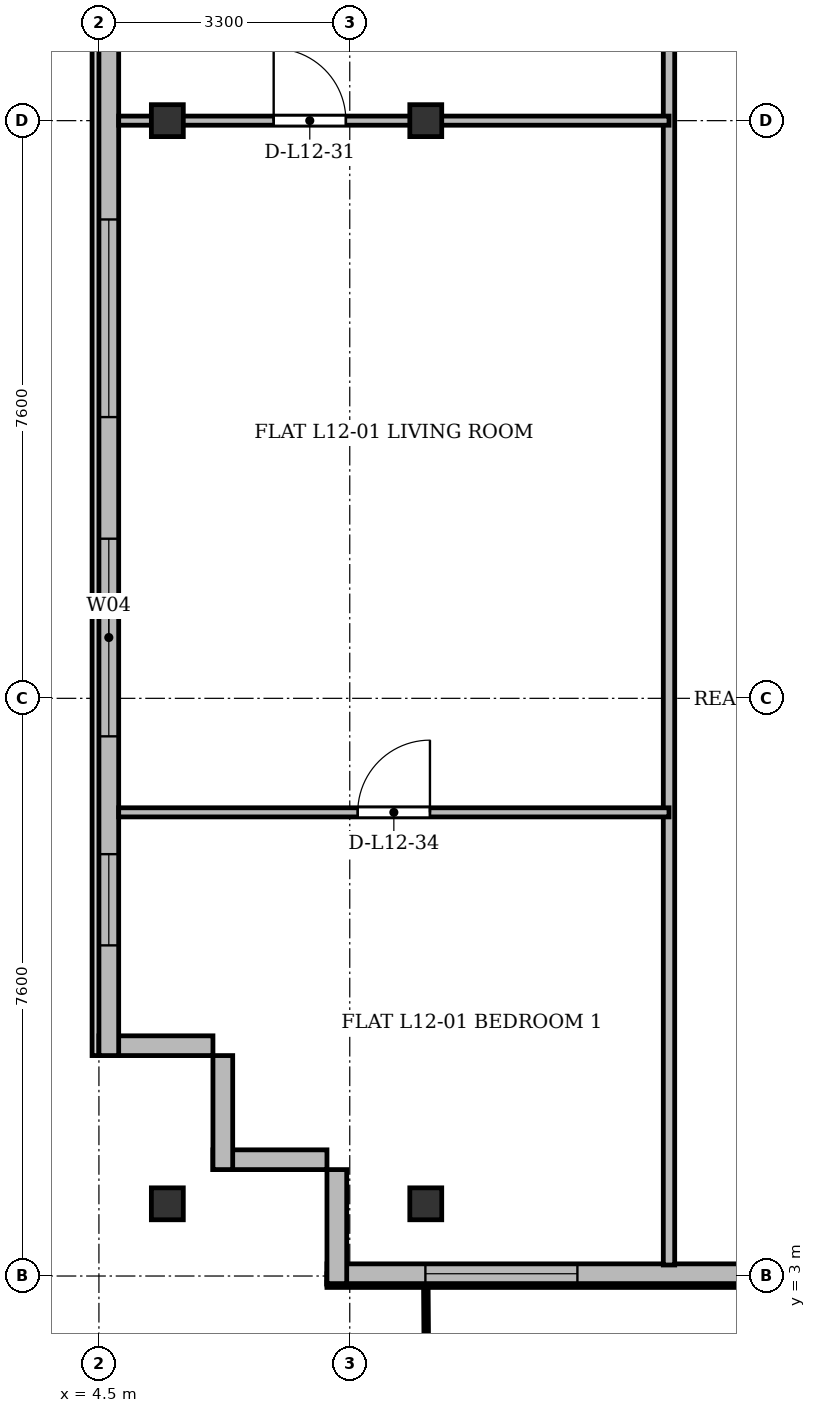
"""IFC4 building model, lengths in metres.
Left out: names, types, materials, properties, quantities, classifications, styles, units other than length and angle.
Written with IfcOpenShell. Run it as: python <this file> out.ifc"""

import sys

from ifc_helpers import new_model, si_unit, direction, frame, frame_2d, origin, origin_2d, place, context, subcontext, project, spatial, rectangle, i_section, extrude, source, transform, mapped, element, fill, save


model = new_model("IFC4")
c1 = context("Model", 3, precision=1e-05, world=origin(), true_north=direction((0.0, 1.0)))
c2 = subcontext(c1, "Body", "Model", "MODEL_VIEW")
j1 = project(units=[si_unit("LENGTHUNIT", "METRE"), si_unit("PLANEANGLEUNIT", "RADIAN")], contexts=[c1])
p1 = place(None, origin())
s1 = spatial("IfcSite", under=j1, at=p1, CompositionType="ELEMENT")
p2 = place(p1, origin())
s2 = spatial("IfcBuilding", under=s1, at=p2, CompositionType="ELEMENT")
p3 = place(p2, frame((0.0, 0.0, 48.7)))
s3 = spatial("IfcBuildingStorey", under=s2, at=p3, CompositionType="ELEMENT", Elevation=48.7)
m1 = source(origin(), c2, "Body", "SweptSolid", [
    extrude(i_section(OverallWidth=0.42, OverallDepth=0.42, WebThickness=0.026, FlangeThickness=0.04, at=origin_2d()), origin(), (0.0, 0.0, 1.0), 3.6),
])
for number, where, z_axis, x_axis in (
    (1, (5.4, 3.95, 0.0), (0.0, 0.0, 1.0), (1.0, 0.0, 0.0)),
    (2, (5.4, 18.2, 0.0), (0.0, 0.0, 1.0), (1.0, 0.0, 0.0)),
    (3, (8.8, 3.95, 0.0), (0.0, 0.0, 1.0), (1.0, 0.0, 0.0)),
    (4, (8.8, 18.2, 0.0), (0.0, 0.0, 1.0), (1.0, 0.0, 0.0)),
):
    element("IfcColumn", number, at=place(p3, frame(where, z_axis=z_axis, x_axis=x_axis)), inside=s3, PredefinedType="COLUMN", context=c2, shape_type="MappedRepresentation", body=[
        mapped(m1, transform((0.0, 0.0, 0.0), x_axis=(1.0, 0.0, 0.0), y_axis=(0.0, 1.0, 0.0), z_axis=(0.0, 0.0, 1.0), scale=1.0)),
    ])
for number, where, z_axis, x_axis in (
    (5, (7.5, 4.53, 0.0), (0.0, 0.0, 1.0), (-1.0, 0.0, 0.0)),
    (6, (6.13, 4.4, 0.0), (0.0, 0.0, 1.0), (0.0, 1.0, 0.0)),
):
    element("IfcWall", number, at=place(p3, frame(where, z_axis=z_axis, x_axis=x_axis)), inside=s3, PredefinedType="SOLIDWALL", context=c2, shape_type="SweptSolid", body=[
        extrude(rectangle(XDim=1.5, YDim=0.26, at=frame_2d((0.75, 0.0))), origin(), (0.0, 0.0, 1.0), 3.34),
    ])
p4 = place(p3, frame((6.0, 6.03, 0.0), z_axis=(0.0, 0.0, 1.0), x_axis=(-1.0, 0.0, 0.0)))
e7 = element("IfcWall", 7, at=p4, inside=s3, PredefinedType="SOLIDWALL", context=c2, shape_type="SweptSolid", body=[
    extrude(rectangle(XDim=1.5, YDim=0.26, at=frame_2d((0.75, 0.0))), origin(), (0.0, 0.0, 1.0), 2.752),
])
p5 = place(p3, frame((4.63, 5.9, 0.0), z_axis=(0.0, 0.0, 1.0), x_axis=(0.0, 1.0, 0.0)))
e8 = element("IfcWall", 8, at=p5, inside=s3, PredefinedType="SOLIDWALL", context=c2, shape_type="SweptSolid", body=[
    extrude(rectangle(XDim=39.6, YDim=0.26, at=frame_2d((19.8, 0.0))), origin(), (0.0, 0.0, 1.0), 3.34),
])
p6 = place(p5, frame((1.45, 0.0, 0.92)))
e9 = element("IfcOpeningElement", 9, at=p6, cuts=e8, PredefinedType="OPENING", context=c2, shape_type="SweptSolid", body=[
    extrude(rectangle(XDim=1.2, YDim=1.65, at=frame_2d((0.6, 0.825))), frame((0.0, 0.14, 0.0), z_axis=(0.0, -1.0, 0.0), x_axis=(1.0, 0.0, 0.0)), (0.0, 0.0, 1.0), 0.28),
])
p7 = place(p5, frame((4.2, 0.0, 0.92)))
e10 = element("IfcOpeningElement", 10, at=p7, cuts=e8, PredefinedType="OPENING", context=c2, shape_type="SweptSolid", body=[
    extrude(rectangle(XDim=2.6, YDim=1.9, at=frame_2d((1.3, 0.95))), frame((0.0, 0.14, 0.0), z_axis=(0.0, -1.0, 0.0), x_axis=(1.0, 0.0, 0.0)), (0.0, 0.0, 1.0), 0.28),
])
p8 = place(p5, frame((8.4, 0.0, 0.92)))
e11 = element("IfcOpeningElement", 11, at=p8, cuts=e8, PredefinedType="OPENING", context=c2, shape_type="SweptSolid", body=[
    extrude(rectangle(XDim=2.6, YDim=1.9, at=frame_2d((1.3, 0.95))), frame((0.0, 0.14, 0.0), z_axis=(0.0, -1.0, 0.0), x_axis=(1.0, 0.0, 0.0)), (0.0, 0.0, 1.0), 0.28),
])
p9 = place(p5, frame((29.6, 0.0, 0.92)))
e12 = element("IfcOpeningElement", 12, at=p9, cuts=e8, PredefinedType="OPENING", context=c2, shape_type="SweptSolid", body=[
    extrude(rectangle(XDim=2.6, YDim=1.9, at=frame_2d((1.3, 0.95))), frame((0.0, 0.14, 0.0), z_axis=(0.0, -1.0, 0.0), x_axis=(1.0, 0.0, 0.0)), (0.0, 0.0, 1.0), 0.28),
])
p10 = place(p5, frame((33.9, 0.0, 0.92)))
e13 = element("IfcOpeningElement", 13, at=p10, cuts=e8, PredefinedType="OPENING", context=c2, shape_type="SweptSolid", body=[
    extrude(rectangle(XDim=1.2, YDim=1.65, at=frame_2d((0.6, 0.825))), frame((0.0, 0.14, 0.0), z_axis=(0.0, -1.0, 0.0), x_axis=(1.0, 0.0, 0.0)), (0.0, 0.0, 1.0), 0.28),
])
p11 = place(p5, frame((37.25, 0.0, 0.92)))
e14 = element("IfcOpeningElement", 14, at=p11, cuts=e8, PredefinedType="OPENING", context=c2, shape_type="SweptSolid", body=[
    extrude(rectangle(XDim=1.2, YDim=1.65, at=frame_2d((0.6, 0.825))), frame((0.0, 0.14, 0.0), z_axis=(0.0, -1.0, 0.0), x_axis=(1.0, 0.0, 0.0)), (0.0, 0.0, 1.0), 0.28),
])
p12 = place(p3, frame((66.9, 3.03, 0.0), z_axis=(0.0, 0.0, 1.0), x_axis=(-1.0, 0.0, 0.0)))
e15 = element("IfcWall", 15, at=p12, inside=s3, PredefinedType="SOLIDWALL", context=c2, shape_type="SweptSolid", body=[
    extrude(rectangle(XDim=59.4, YDim=0.26, at=frame_2d((29.7, 0.0))), origin(), (0.0, 0.0, 1.0), 3.34),
])
p13 = place(p12, frame((0.745, 0.0, 0.9)))
e16 = element("IfcOpeningElement", 16, at=p13, cuts=e15, PredefinedType="OPENING", context=c2, shape_type="SweptSolid", body=[
    extrude(rectangle(XDim=1.5, YDim=1.75, at=frame_2d((0.75, 0.875))), frame((0.0, 0.14, 0.0), z_axis=(0.0, -1.0, 0.0), x_axis=(1.0, 0.0, 0.0)), (0.0, 0.0, 1.0), 0.28),
])
p14 = place(p12, frame((4.5, 0.0, 0.9)))
e17 = element("IfcOpeningElement", 17, at=p14, cuts=e15, PredefinedType="OPENING", context=c2, shape_type="SweptSolid", body=[
    extrude(rectangle(XDim=2.0, YDim=1.95, at=frame_2d((1.0, 0.975))), frame((0.0, 0.14, 0.0), z_axis=(0.0, -1.0, 0.0), x_axis=(1.0, 0.0, 0.0)), (0.0, 0.0, 1.0), 0.28),
])
p15 = place(p12, frame((11.175, 0.0, 0.9)))
e18 = element("IfcOpeningElement", 18, at=p15, cuts=e15, PredefinedType="OPENING", context=c2, shape_type="SweptSolid", body=[
    extrude(rectangle(XDim=1.65, YDim=1.85, at=frame_2d((0.825, 0.925))), frame((0.0, 0.14, 0.0), z_axis=(0.0, -1.0, 0.0), x_axis=(1.0, 0.0, 0.0)), (0.0, 0.0, 1.0), 0.28),
])
p16 = place(p12, frame((17.007, 0.0, 0.0)))
e19 = element("IfcOpeningElement", 19, at=p16, cuts=e15, PredefinedType="OPENING", context=c2, shape_type="SweptSolid", body=[
    extrude(rectangle(XDim=1.2, YDim=2.2, at=frame_2d((0.6, 1.1))), frame((0.0, 0.14, 0.0), z_axis=(0.0, -1.0, 0.0), x_axis=(1.0, 0.0, 0.0)), (0.0, 0.0, 1.0), 0.28),
])
p17 = place(p12, frame((20.2, 0.0, 0.9)))
e20 = element("IfcOpeningElement", 20, at=p17, cuts=e15, PredefinedType="OPENING", context=c2, shape_type="SweptSolid", body=[
    extrude(rectangle(XDim=2.2, YDim=1.8, at=frame_2d((1.1, 0.9))), frame((0.0, 0.14, 0.0), z_axis=(0.0, -1.0, 0.0), x_axis=(1.0, 0.0, 0.0)), (0.0, 0.0, 1.0), 0.28),
])
p18 = place(p12, frame((24.75, 0.0, 0.9)))
e21 = element("IfcOpeningElement", 21, at=p18, cuts=e15, PredefinedType="OPENING", context=c2, shape_type="SweptSolid", body=[
    extrude(rectangle(XDim=1.5, YDim=1.75, at=frame_2d((0.75, 0.875))), frame((0.0, 0.14, 0.0), z_axis=(0.0, -1.0, 0.0), x_axis=(1.0, 0.0, 0.0)), (0.0, 0.0, 1.0), 0.28),
])
p19 = place(p12, frame((31.1, 0.0, 0.9)))
e22 = element("IfcOpeningElement", 22, at=p19, cuts=e15, PredefinedType="OPENING", context=c2, shape_type="SweptSolid", body=[
    extrude(rectangle(XDim=2.0, YDim=1.95, at=frame_2d((1.0, 0.975))), frame((0.0, 0.14, 0.0), z_axis=(0.0, -1.0, 0.0), x_axis=(1.0, 0.0, 0.0)), (0.0, 0.0, 1.0), 0.28),
])
p20 = place(p12, frame((39.075, 0.0, 0.9)))
e23 = element("IfcOpeningElement", 23, at=p20, cuts=e15, PredefinedType="OPENING", context=c2, shape_type="SweptSolid", body=[
    extrude(rectangle(XDim=1.65, YDim=1.85, at=frame_2d((0.825, 0.925))), frame((0.0, 0.14, 0.0), z_axis=(0.0, -1.0, 0.0), x_axis=(1.0, 0.0, 0.0)), (0.0, 0.0, 1.0), 0.28),
])
p21 = place(p12, frame((45.435, 0.0, 0.0)))
e24 = element("IfcOpeningElement", 24, at=p21, cuts=e15, PredefinedType="OPENING", context=c2, shape_type="SweptSolid", body=[
    extrude(rectangle(XDim=1.2, YDim=2.2, at=frame_2d((0.6, 1.1))), frame((0.0, 0.14, 0.0), z_axis=(0.0, -1.0, 0.0), x_axis=(1.0, 0.0, 0.0)), (0.0, 0.0, 1.0), 0.28),
])
p22 = place(p12, frame((48.25, 0.0, 0.9)))
e25 = element("IfcOpeningElement", 25, at=p22, cuts=e15, PredefinedType="OPENING", context=c2, shape_type="SweptSolid", body=[
    extrude(rectangle(XDim=2.2, YDim=1.8, at=frame_2d((1.1, 0.9))), frame((0.0, 0.14, 0.0), z_axis=(0.0, -1.0, 0.0), x_axis=(1.0, 0.0, 0.0)), (0.0, 0.0, 1.0), 0.28),
])
p23 = place(p12, frame((52.35, 0.0, 0.9)))
e26 = element("IfcOpeningElement", 26, at=p23, cuts=e15, PredefinedType="OPENING", context=c2, shape_type="SweptSolid", body=[
    extrude(rectangle(XDim=1.5, YDim=1.75, at=frame_2d((0.75, 0.875))), frame((0.0, 0.14, 0.0), z_axis=(0.0, -1.0, 0.0), x_axis=(1.0, 0.0, 0.0)), (0.0, 0.0, 1.0), 0.28),
])
p24 = place(p12, frame((56.105, 0.0, 0.9)))
e27 = element("IfcOpeningElement", 27, at=p24, cuts=e15, PredefinedType="OPENING", context=c2, shape_type="SweptSolid", body=[
    extrude(rectangle(XDim=2.0, YDim=1.95, at=frame_2d((1.0, 0.975))), frame((0.0, 0.14, 0.0), z_axis=(0.0, -1.0, 0.0), x_axis=(1.0, 0.0, 0.0)), (0.0, 0.0, 1.0), 0.28),
])
p25 = place(p3, frame((7.63, 2.9, 0.0), z_axis=(0.0, 0.0, 1.0), x_axis=(0.0, 1.0, 0.0)))
e28 = element("IfcWall", 28, at=p25, inside=s3, PredefinedType="SOLIDWALL", context=c2, shape_type="SweptSolid", body=[
    extrude(rectangle(XDim=1.5, YDim=0.26, at=frame_2d((0.75, 0.0))), origin(), (0.0, 0.0, 1.0), 2.69),
])
p26 = place(p3, frame((12.0, 3.145, 0.0), z_axis=(0.0, 0.0, 1.0), x_axis=(0.0, 1.0, 0.0)))
e29 = element("IfcWall", 29, at=p26, inside=s3, PredefinedType="PARTITIONING", context=c2, shape_type="SweptSolid", body=[
    extrude(rectangle(XDim=24.455, YDim=0.15, at=frame_2d((12.228, 0.0))), origin(), (0.0, 0.0, 1.0), 2.69),
])
p27 = place(p3, frame((4.76, 18.2, 0.0), z_axis=(0.0, 0.0, 1.0), x_axis=(1.0, 0.0, 0.0)))
e30 = element("IfcWall", 30, at=p27, inside=s3, PredefinedType="PARTITIONING", context=c2, shape_type="SweptSolid", body=[
    extrude(rectangle(XDim=7.24, YDim=0.12, at=frame_2d((3.62, 0.0))), origin(), (0.0, 0.0, 1.0), 2.69),
])
p28 = place(p27, frame((2.039, 0.0, 0.0)))
e31 = element("IfcOpeningElement", 31, at=p28, cuts=e30, PredefinedType="OPENING", context=c2, shape_type="SweptSolid", body=[
    extrude(rectangle(XDim=0.95, YDim=2.15, at=frame_2d((0.475, 1.075))), frame((0.0, 0.07, 0.0), z_axis=(0.0, -1.0, 0.0), x_axis=(1.0, 0.0, 0.0)), (0.0, 0.0, 1.0), 0.14),
])
p29 = place(p3, frame((4.76, 9.1, 0.0), z_axis=(0.0, 0.0, 1.0), x_axis=(1.0, 0.0, 0.0)))
e32 = element("IfcWall", 32, at=p29, inside=s3, PredefinedType="PARTITIONING", context=c2, shape_type="SweptSolid", body=[
    extrude(rectangle(XDim=7.24, YDim=0.12, at=frame_2d((3.62, 0.0))), origin(), (0.0, 0.0, 1.0), 2.752),
])
p30 = place(p29, frame((3.145, 0.0, 0.0)))
e33 = element("IfcOpeningElement", 33, at=p30, cuts=e32, PredefinedType="OPENING", context=c2, shape_type="SweptSolid", body=[
    extrude(rectangle(XDim=0.95, YDim=2.15, at=frame_2d((0.475, 1.075))), frame((0.0, 0.07, 0.0), z_axis=(0.0, -1.0, 0.0), x_axis=(1.0, 0.0, 0.0)), (0.0, 0.0, 1.0), 0.14),
])
m2 = source(origin(), c2, "Body", "SweptSolid", [
    extrude(rectangle(XDim=1.2, YDim=1.65, at=frame_2d((0.6, 0.825))), frame((0.0, 0.03, 0.0), z_axis=(0.0, -1.0, 0.0), x_axis=(1.0, 0.0, 0.0)), (0.0, 0.0, 1.0), 0.06),
])
p31 = place(p6, origin())
e34 = element("IfcWindow", 34, at=p31, inside=s3, PartitioningType="SINGLE_PANEL", PredefinedType="WINDOW", context=c2, shape_type="MappedRepresentation", body=[
    mapped(m2, transform((0.0, 0.0, 0.0), x_axis=(1.0, 0.0, 0.0), y_axis=(0.0, 1.0, 0.0), z_axis=(0.0, 0.0, 1.0), scale=1.0)),
])
fill(e9, e34)
m3 = source(origin(), c2, "Body", "SweptSolid", [
    extrude(rectangle(XDim=2.6, YDim=1.9, at=frame_2d((1.3, 0.95))), frame((0.0, 0.03, 0.0), z_axis=(0.0, -1.0, 0.0), x_axis=(1.0, 0.0, 0.0)), (0.0, 0.0, 1.0), 0.06),
])
p32 = place(p7, origin())
e35 = element("IfcWindow", 35, at=p32, inside=s3, PartitioningType="SINGLE_PANEL", PredefinedType="WINDOW", context=c2, shape_type="MappedRepresentation", body=[
    mapped(m3, transform((0.0, 0.0, 0.0), x_axis=(1.0, 0.0, 0.0), y_axis=(0.0, 1.0, 0.0), z_axis=(0.0, 0.0, 1.0), scale=1.0)),
])
fill(e10, e35)
p33 = place(p8, origin())
e36 = element("IfcWindow", 36, at=p33, inside=s3, PartitioningType="SINGLE_PANEL", PredefinedType="WINDOW", context=c2, shape_type="MappedRepresentation", body=[
    mapped(m3, transform((0.0, 0.0, 0.0), x_axis=(1.0, 0.0, 0.0), y_axis=(0.0, 1.0, 0.0), z_axis=(0.0, 0.0, 1.0), scale=1.0)),
])
fill(e11, e36)
m4 = source(origin(), c2, "Body", "SweptSolid", [
    extrude(rectangle(XDim=2.0, YDim=1.95, at=frame_2d((1.0, 0.975))), frame((0.0, 0.03, 0.0), z_axis=(0.0, -1.0, 0.0), x_axis=(1.0, 0.0, 0.0)), (0.0, 0.0, 1.0), 0.06),
])
p34 = place(p24, origin())
e37 = element("IfcWindow", 37, at=p34, inside=s3, PartitioningType="SINGLE_PANEL", PredefinedType="WINDOW", context=c2, shape_type="MappedRepresentation", body=[
    mapped(m4, transform((0.0, 0.0, 0.0), x_axis=(1.0, 0.0, 0.0), y_axis=(0.0, 1.0, 0.0), z_axis=(0.0, 0.0, 1.0), scale=1.0)),
])
fill(e27, e37)
m5 = source(origin(), c2, "Body", "SweptSolid", [
    extrude(rectangle(XDim=0.95, YDim=2.15, at=frame_2d((0.475, 1.075))), frame((0.0, 0.025, 0.0), z_axis=(0.0, -1.0, 0.0), x_axis=(1.0, 0.0, 0.0)), (0.0, 0.0, 1.0), 0.05),
])
p35 = place(p28, origin())
e38 = element("IfcDoor", 38, at=p35, inside=s3, OperationType="SINGLE_SWING_LEFT", PredefinedType="DOOR", context=c2, shape_type="MappedRepresentation", body=[
    mapped(m5, transform((0.0, 0.0, 0.0), x_axis=(1.0, 0.0, 0.0), y_axis=(0.0, 1.0, 0.0), z_axis=(0.0, 0.0, 1.0), scale=1.0)),
])
fill(e31, e38)
p36 = place(p30, origin())
e39 = element("IfcDoor", 39, at=p36, inside=s3, OperationType="SINGLE_SWING_RIGHT", PredefinedType="DOOR", context=c2, shape_type="MappedRepresentation", body=[
    mapped(m5, transform((0.0, 0.0, 0.0), x_axis=(1.0, 0.0, 0.0), y_axis=(0.0, 1.0, 0.0), z_axis=(0.0, 0.0, 1.0), scale=1.0)),
])
fill(e33, e39)
save(model, sys.argv[1])
